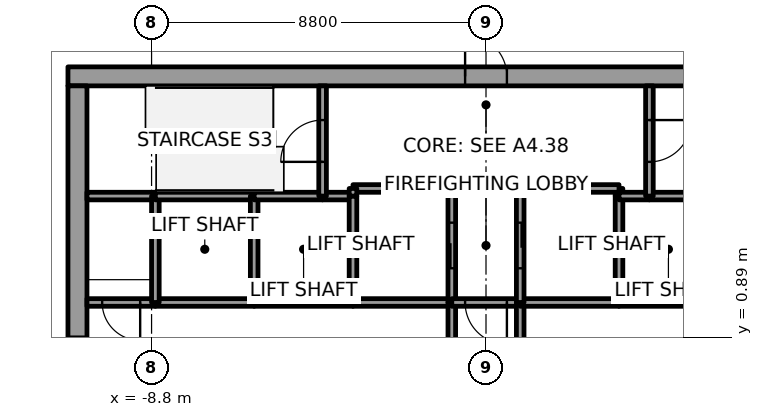
"""IFC4 building model, lengths in metres.
Left out: names, types, materials, properties, quantities, classifications, styles, units other than length and angle.
Written with IfcOpenShell. Run it as: python <this file> out.ifc"""

import sys

from ifc_helpers import new_model, si_unit, direction, frame, frame_2d, origin, place, context, subcontext, project, spatial, rectangle, extrude, element, fill, save


model = new_model("IFC4")
c1 = context("Model", 3, precision=1e-05, world=origin(), true_north=direction((0.0, 1.0)))
c2 = subcontext(c1, "Body", "Model", "MODEL_VIEW")
j1 = project(units=[si_unit("LENGTHUNIT", "METRE"), si_unit("PLANEANGLEUNIT", "RADIAN")], contexts=[c1])
p1 = place(None, origin())
s1 = spatial("IfcSite", under=j1, at=p1, CompositionType="ELEMENT")
p2 = place(p1, origin())
s2 = spatial("IfcBuilding", under=s1, at=p2, CompositionType="ELEMENT")
p3 = place(p2, frame((0.0, 0.0, 165.8)))
s3 = spatial("IfcBuildingStorey", under=s2, at=p3, CompositionType="ELEMENT", Elevation=165.8)
p4 = place(p3, frame((-11.0, 7.75, 0.0), z_axis=(0.0, 0.0, 1.0), x_axis=(1.0, 0.0, 0.0)))
e1 = element("IfcWall", 1, at=p4, inside=s3, PredefinedType="SHEAR", context=c2, shape_type="SweptSolid", body=[
    extrude(rectangle(XDim=22.0, YDim=0.5, at=frame_2d((11.0, 0.0))), origin(), (0.0, 0.0, 1.0), 4.0),
])
p5 = place(p4, frame((10.45, 0.0, 0.0)))
e2 = element("IfcOpeningElement", 2, at=p5, cuts=e1, PredefinedType="OPENING", context=c2, shape_type="SweptSolid", body=[
    extrude(rectangle(XDim=1.1, YDim=2.1, at=frame_2d((0.55, 1.05))), frame((0.0, 0.25, 0.0), z_axis=(0.0, -1.0, 0.0), x_axis=(1.0, 0.0, 0.0)), (0.0, 0.0, 1.0), 0.5),
])
p6 = place(p3, frame((-10.75, -7.5, 0.0), z_axis=(0.0, 0.0, 1.0), x_axis=(0.0, 1.0, 0.0)))
e3 = element("IfcWall", 3, at=p6, inside=s3, PredefinedType="SHEAR", context=c2, shape_type="SweptSolid", body=[
    extrude(rectangle(XDim=15.0, YDim=0.5, at=frame_2d((7.5, 0.0))), origin(), (0.0, 0.0, 1.0), 4.0),
])
p7 = place(p6, frame((6.6, 0.0, 0.0)))
e4 = element("IfcOpeningElement", 4, at=p7, cuts=e3, PredefinedType="OPENING", context=c2, shape_type="SweptSolid", body=[
    extrude(rectangle(XDim=1.8, YDim=2.1, at=frame_2d((0.9, 1.05))), frame((0.0, 0.25, 0.0), z_axis=(0.0, -1.0, 0.0), x_axis=(1.0, 0.0, 0.0)), (0.0, 0.0, 1.0), 0.5),
])
p8 = place(p3, frame((-8.7, 1.8, 0.0), z_axis=(0.0, 0.0, 1.0), x_axis=(-1.0, 0.0, 0.0)))
e5 = element("IfcWall", 5, at=p8, inside=s3, PredefinedType="SOLIDWALL", context=c2, shape_type="SweptSolid", body=[
    extrude(rectangle(XDim=1.8, YDim=0.2, at=frame_2d((0.9, 0.0))), origin(), (0.0, 0.0, 1.0), 3.85),
])
p9 = place(p8, frame((0.4, 0.0, 0.0)))
e6 = element("IfcOpeningElement", 6, at=p9, cuts=e5, PredefinedType="OPENING", context=c2, shape_type="SweptSolid", body=[
    extrude(rectangle(XDim=1.0, YDim=2.1, at=frame_2d((0.5, 1.05))), frame((0.0, 0.1, 0.0), z_axis=(0.0, -1.0, 0.0), x_axis=(1.0, 0.0, 0.0)), (0.0, 0.0, 1.0), 0.2),
])
p10 = place(p3, frame((-8.7, 4.6, 0.0), z_axis=(0.0, 0.0, 1.0), x_axis=(-1.0, 0.0, 0.0)))
e7 = element("IfcWall", 7, at=p10, inside=s3, PredefinedType="SOLIDWALL", context=c2, shape_type="SweptSolid", body=[
    extrude(rectangle(XDim=1.8, YDim=0.2, at=frame_2d((0.9, 0.0))), origin(), (0.0, 0.0, 1.0), 3.85),
])
p11 = place(p3, frame((-6.1, 1.8, 0.0), z_axis=(0.0, 0.0, 1.0), x_axis=(-1.0, 0.0, 0.0)))
e8 = element("IfcWall", 8, at=p11, inside=s3, PredefinedType="SOLIDWALL", context=c2, shape_type="SweptSolid", body=[
    extrude(rectangle(XDim=2.6, YDim=0.2, at=frame_2d((1.3, 0.0))), origin(), (0.0, 0.0, 1.0), 3.85),
])
p12 = place(p3, frame((-8.7, 1.8, 0.0), z_axis=(0.0, 0.0, 1.0), x_axis=(0.0, 1.0, 0.0)))
e9 = element("IfcWall", 9, at=p12, inside=s3, PredefinedType="SOLIDWALL", context=c2, shape_type="SweptSolid", body=[
    extrude(rectangle(XDim=2.8, YDim=0.2, at=frame_2d((1.4, 0.0))), origin(), (0.0, 0.0, 1.0), 3.85),
])
p13 = place(p3, frame((-6.1, 4.6, 0.0), z_axis=(0.0, 0.0, 1.0), x_axis=(-1.0, 0.0, 0.0)))
e10 = element("IfcWall", 10, at=p13, inside=s3, PredefinedType="SOLIDWALL", context=c2, shape_type="SweptSolid", body=[
    extrude(rectangle(XDim=2.6, YDim=0.2, at=frame_2d((1.3, 0.0))), origin(), (0.0, 0.0, 1.0), 3.85),
])
p14 = place(p3, frame((-3.5, 1.8, 0.0), z_axis=(0.0, 0.0, 1.0), x_axis=(-1.0, 0.0, 0.0)))
e11 = element("IfcWall", 11, at=p14, inside=s3, PredefinedType="SOLIDWALL", context=c2, shape_type="SweptSolid", body=[
    extrude(rectangle(XDim=2.6, YDim=0.2, at=frame_2d((1.3, 0.0))), origin(), (0.0, 0.0, 1.0), 3.85),
])
p15 = place(p3, frame((-6.1, 1.8, 0.0), z_axis=(0.0, 0.0, 1.0), x_axis=(0.0, 1.0, 0.0)))
e12 = element("IfcWall", 12, at=p15, inside=s3, PredefinedType="SOLIDWALL", context=c2, shape_type="SweptSolid", body=[
    extrude(rectangle(XDim=2.8, YDim=0.2, at=frame_2d((1.4, 0.0))), origin(), (0.0, 0.0, 1.0), 3.85),
])
p16 = place(p3, frame((-4.3, 4.6, 0.0), z_axis=(0.0, 0.0, 1.0), x_axis=(-1.0, 0.0, 0.0)))
e13 = element("IfcWall", 13, at=p16, inside=s3, PredefinedType="SOLIDWALL", context=c2, shape_type="SweptSolid", body=[
    extrude(rectangle(XDim=1.8, YDim=0.2, at=frame_2d((0.9, 0.0))), origin(), (0.0, 0.0, 1.0), 3.85),
])
p17 = place(p3, frame((-3.5, 4.6, 0.0), z_axis=(0.0, 0.0, 1.0), x_axis=(-1.0, 0.0, 0.0)))
e14 = element("IfcWall", 14, at=p17, inside=s3, PredefinedType="SOLIDWALL", context=c2, shape_type="SweptSolid", body=[
    extrude(rectangle(XDim=0.8, YDim=0.2, at=frame_2d((0.4, 0.0))), origin(), (0.0, 0.0, 1.0), 3.85),
])
p18 = place(p3, frame((-4.3, 4.6, 0.0), z_axis=(0.0, 0.0, 1.0), x_axis=(0.0, 1.0, 0.0)))
e15 = element("IfcWall", 15, at=p18, inside=s3, PredefinedType="SOLIDWALL", context=c2, shape_type="SweptSolid", body=[
    extrude(rectangle(XDim=2.9, YDim=0.2, at=frame_2d((1.45, 0.0))), origin(), (0.0, 0.0, 1.0), 3.85),
])
p19 = place(p18, frame((0.9, 0.0, 0.0)))
e16 = element("IfcOpeningElement", 16, at=p19, cuts=e15, PredefinedType="OPENING", context=c2, shape_type="SweptSolid", body=[
    extrude(rectangle(XDim=1.1, YDim=2.1, at=frame_2d((0.55, 1.05))), frame((0.0, 0.1, 0.0), z_axis=(0.0, -1.0, 0.0), x_axis=(1.0, 0.0, 0.0)), (0.0, 0.0, 1.0), 0.2),
])
p20 = place(p3, frame((-0.9, 1.8, 0.0), z_axis=(0.0, 0.0, 1.0), x_axis=(-1.0, 0.0, 0.0)))
e17 = element("IfcWall", 17, at=p20, inside=s3, PredefinedType="SOLIDWALL", context=c2, shape_type="SweptSolid", body=[
    extrude(rectangle(XDim=2.6, YDim=0.2, at=frame_2d((1.3, 0.0))), origin(), (0.0, 0.0, 1.0), 3.85),
])
p21 = place(p3, frame((-3.5, 4.6, 0.0), z_axis=(0.0, 0.0, 1.0), x_axis=(0.0, -1.0, 0.0)))
e18 = element("IfcWall", 18, at=p21, inside=s3, PredefinedType="SOLIDWALL", context=c2, shape_type="SweptSolid", body=[
    extrude(rectangle(XDim=2.8, YDim=0.2, at=frame_2d((1.4, 0.0))), origin(), (0.0, 0.0, 1.0), 3.85),
])
p22 = place(p3, frame((-0.9, 1.8, 0.0), z_axis=(0.0, 0.0, 1.0), x_axis=(0.0, 1.0, 0.0)))
e19 = element("IfcWall", 19, at=p22, inside=s3, PredefinedType="SOLIDWALL", context=c2, shape_type="SweptSolid", body=[
    extrude(rectangle(XDim=3.0, YDim=0.2, at=frame_2d((1.5, 0.0))), origin(), (0.0, 0.0, 1.0), 3.85),
])
p23 = place(p22, frame((0.9, 0.0, 0.0)))
e20 = element("IfcOpeningElement", 20, at=p23, cuts=e19, PredefinedType="OPENING", context=c2, shape_type="SweptSolid", body=[
    extrude(rectangle(XDim=1.2, YDim=2.1, at=frame_2d((0.6, 1.05))), frame((0.0, 0.1, 0.0), z_axis=(0.0, -1.0, 0.0), x_axis=(1.0, 0.0, 0.0)), (0.0, 0.0, 1.0), 0.2),
])
p24 = place(p3, frame((-0.9, 4.8, 0.0), z_axis=(0.0, 0.0, 1.0), x_axis=(-1.0, 0.0, 0.0)))
e21 = element("IfcWall", 21, at=p24, inside=s3, PredefinedType="SOLIDWALL", context=c2, shape_type="SweptSolid", body=[
    extrude(rectangle(XDim=2.6, YDim=0.2, at=frame_2d((1.3, 0.0))), origin(), (0.0, 0.0, 1.0), 3.85),
])
p25 = place(p3, frame((-3.5, 4.8, 0.0), z_axis=(0.0, 0.0, 1.0), x_axis=(0.0, -1.0, 0.0)))
e22 = element("IfcWall", 22, at=p25, inside=s3, PredefinedType="SOLIDWALL", context=c2, shape_type="SweptSolid", body=[
    extrude(rectangle(XDim=0.2, YDim=0.2, at=frame_2d((0.1, 0.0))), origin(), (0.0, 0.0, 1.0), 3.85),
])
p26 = place(p3, frame((-0.9, 1.8, 0.0), z_axis=(0.0, 0.0, 1.0), x_axis=(0.0, -1.0, 0.0)))
e23 = element("IfcWall", 23, at=p26, inside=s3, PredefinedType="SOLIDWALL", context=c2, shape_type="SweptSolid", body=[
    extrude(rectangle(XDim=3.6, YDim=0.2, at=frame_2d((1.8, 0.0))), origin(), (0.0, 0.0, 1.0), 3.85),
])
p27 = place(p26, frame((1.05, 0.0, 0.0)))
e24 = element("IfcOpeningElement", 24, at=p27, cuts=e23, PredefinedType="OPENING", context=c2, shape_type="SweptSolid", body=[
    extrude(rectangle(XDim=1.5, YDim=2.1, at=frame_2d((0.75, 1.05))), frame((0.0, 0.1, 0.0), z_axis=(0.0, -1.0, 0.0), x_axis=(1.0, 0.0, 0.0)), (0.0, 0.0, 1.0), 0.2),
])
p28 = place(p3, frame((0.9, 1.8, 0.0), z_axis=(0.0, 0.0, 1.0), x_axis=(-1.0, 0.0, 0.0)))
e25 = element("IfcWall", 25, at=p28, inside=s3, PredefinedType="SOLIDWALL", context=c2, shape_type="SweptSolid", body=[
    extrude(rectangle(XDim=1.8, YDim=0.2, at=frame_2d((0.9, 0.0))), origin(), (0.0, 0.0, 1.0), 3.85),
])
p29 = place(p28, frame((0.35, 0.0, 0.0)))
e26 = element("IfcOpeningElement", 26, at=p29, cuts=e25, PredefinedType="OPENING", context=c2, shape_type="SweptSolid", body=[
    extrude(rectangle(XDim=1.1, YDim=2.1, at=frame_2d((0.55, 1.05))), frame((0.0, 0.1, 0.0), z_axis=(0.0, -1.0, 0.0), x_axis=(1.0, 0.0, 0.0)), (0.0, 0.0, 1.0), 0.2),
])
p30 = place(p3, frame((0.9, -1.8, 0.0), z_axis=(0.0, 0.0, 1.0), x_axis=(0.0, 1.0, 0.0)))
e27 = element("IfcWall", 27, at=p30, inside=s3, PredefinedType="SOLIDWALL", context=c2, shape_type="SweptSolid", body=[
    extrude(rectangle(XDim=3.6, YDim=0.2, at=frame_2d((1.8, 0.0))), origin(), (0.0, 0.0, 1.0), 3.85),
])
p31 = place(p30, frame((1.05, 0.0, 0.0)))
e28 = element("IfcOpeningElement", 28, at=p31, cuts=e27, PredefinedType="OPENING", context=c2, shape_type="SweptSolid", body=[
    extrude(rectangle(XDim=1.5, YDim=2.1, at=frame_2d((0.75, 1.05))), frame((0.0, 0.1, 0.0), z_axis=(0.0, -1.0, 0.0), x_axis=(1.0, 0.0, 0.0)), (0.0, 0.0, 1.0), 0.2),
])
p32 = place(p3, frame((3.5, 1.8, 0.0), z_axis=(0.0, 0.0, 1.0), x_axis=(-1.0, 0.0, 0.0)))
e29 = element("IfcWall", 29, at=p32, inside=s3, PredefinedType="SOLIDWALL", context=c2, shape_type="SweptSolid", body=[
    extrude(rectangle(XDim=2.6, YDim=0.2, at=frame_2d((1.3, 0.0))), origin(), (0.0, 0.0, 1.0), 3.85),
])
p33 = place(p3, frame((3.5, 4.6, 0.0), z_axis=(0.0, 0.0, 1.0), x_axis=(0.0, 1.0, 0.0)))
e30 = element("IfcWall", 30, at=p33, inside=s3, PredefinedType="SOLIDWALL", context=c2, shape_type="SweptSolid", body=[
    extrude(rectangle(XDim=0.2, YDim=0.2, at=frame_2d((0.1, 0.0))), origin(), (0.0, 0.0, 1.0), 3.85),
])
p34 = place(p3, frame((3.5, 4.8, 0.0), z_axis=(0.0, 0.0, 1.0), x_axis=(-1.0, 0.0, 0.0)))
e31 = element("IfcWall", 31, at=p34, inside=s3, PredefinedType="SOLIDWALL", context=c2, shape_type="SweptSolid", body=[
    extrude(rectangle(XDim=2.6, YDim=0.2, at=frame_2d((1.3, 0.0))), origin(), (0.0, 0.0, 1.0), 3.85),
])
p35 = place(p3, frame((0.9, 4.8, 0.0), z_axis=(0.0, 0.0, 1.0), x_axis=(0.0, -1.0, 0.0)))
e32 = element("IfcWall", 32, at=p35, inside=s3, PredefinedType="SOLIDWALL", context=c2, shape_type="SweptSolid", body=[
    extrude(rectangle(XDim=3.0, YDim=0.2, at=frame_2d((1.5, 0.0))), origin(), (0.0, 0.0, 1.0), 3.85),
])
p36 = place(p35, frame((0.9, 0.0, 0.0)))
e33 = element("IfcOpeningElement", 33, at=p36, cuts=e32, PredefinedType="OPENING", context=c2, shape_type="SweptSolid", body=[
    extrude(rectangle(XDim=1.2, YDim=2.1, at=frame_2d((0.6, 1.05))), frame((0.0, 0.1, 0.0), z_axis=(0.0, -1.0, 0.0), x_axis=(1.0, 0.0, 0.0)), (0.0, 0.0, 1.0), 0.2),
])
p37 = place(p3, frame((6.1, 1.8, 0.0), z_axis=(0.0, 0.0, 1.0), x_axis=(-1.0, 0.0, 0.0)))
e34 = element("IfcWall", 34, at=p37, inside=s3, PredefinedType="SOLIDWALL", context=c2, shape_type="SweptSolid", body=[
    extrude(rectangle(XDim=2.6, YDim=0.2, at=frame_2d((1.3, 0.0))), origin(), (0.0, 0.0, 1.0), 3.85),
])
p38 = place(p3, frame((3.5, 1.8, 0.0), z_axis=(0.0, 0.0, 1.0), x_axis=(0.0, 1.0, 0.0)))
e35 = element("IfcWall", 35, at=p38, inside=s3, PredefinedType="SOLIDWALL", context=c2, shape_type="SweptSolid", body=[
    extrude(rectangle(XDim=2.8, YDim=0.2, at=frame_2d((1.4, 0.0))), origin(), (0.0, 0.0, 1.0), 3.85),
])
p39 = place(p3, frame((4.3, 4.6, 0.0), z_axis=(0.0, 0.0, 1.0), x_axis=(-1.0, 0.0, 0.0)))
e36 = element("IfcWall", 36, at=p39, inside=s3, PredefinedType="SOLIDWALL", context=c2, shape_type="SweptSolid", body=[
    extrude(rectangle(XDim=0.8, YDim=0.2, at=frame_2d((0.4, 0.0))), origin(), (0.0, 0.0, 1.0), 3.85),
])
p40 = place(p3, frame((6.1, 4.6, 0.0), z_axis=(0.0, 0.0, 1.0), x_axis=(-1.0, 0.0, 0.0)))
e37 = element("IfcWall", 37, at=p40, inside=s3, PredefinedType="SOLIDWALL", context=c2, shape_type="SweptSolid", body=[
    extrude(rectangle(XDim=1.8, YDim=0.2, at=frame_2d((0.9, 0.0))), origin(), (0.0, 0.0, 1.0), 3.85),
])
p41 = place(p3, frame((4.3, 7.5, 0.0), z_axis=(0.0, 0.0, 1.0), x_axis=(0.0, -1.0, 0.0)))
e38 = element("IfcWall", 38, at=p41, inside=s3, PredefinedType="SOLIDWALL", context=c2, shape_type="SweptSolid", body=[
    extrude(rectangle(XDim=2.9, YDim=0.2, at=frame_2d((1.45, 0.0))), origin(), (0.0, 0.0, 1.0), 3.85),
])
p42 = place(p41, frame((0.9, 0.0, 0.0)))
e39 = element("IfcOpeningElement", 39, at=p42, cuts=e38, PredefinedType="OPENING", context=c2, shape_type="SweptSolid", body=[
    extrude(rectangle(XDim=1.1, YDim=2.1, at=frame_2d((0.55, 1.05))), frame((0.0, 0.1, 0.0), z_axis=(0.0, -1.0, 0.0), x_axis=(1.0, 0.0, 0.0)), (0.0, 0.0, 1.0), 0.2),
])
p43 = place(p23, origin())
e40 = element("IfcDoor", 40, at=p43, inside=s3, OperationType="SLIDING_TO_LEFT", PredefinedType="DOOR", context=c2, shape_type="SweptSolid", body=[
    extrude(rectangle(XDim=1.2, YDim=2.1, at=frame_2d((0.6, 1.05))), frame((0.0, 0.025, 0.0), z_axis=(0.0, -1.0, 0.0), x_axis=(1.0, 0.0, 0.0)), (0.0, 0.0, 1.0), 0.05),
])
fill(e20, e40)
p44 = place(p36, origin())
e41 = element("IfcDoor", 41, at=p44, inside=s3, OperationType="SLIDING_TO_LEFT", PredefinedType="DOOR", context=c2, shape_type="SweptSolid", body=[
    extrude(rectangle(XDim=1.2, YDim=2.1, at=frame_2d((0.6, 1.05))), frame((0.0, 0.025, 0.0), z_axis=(0.0, -1.0, 0.0), x_axis=(1.0, 0.0, 0.0)), (0.0, 0.0, 1.0), 0.05),
])
fill(e33, e41)
p45 = place(p29, origin())
e42 = element("IfcDoor", 42, at=p45, inside=s3, OperationType="SINGLE_SWING_RIGHT", PredefinedType="DOOR", context=c2, shape_type="SweptSolid", body=[
    extrude(rectangle(XDim=1.1, YDim=2.1, at=frame_2d((0.55, 1.05))), frame((0.0, 0.025, 0.0), z_axis=(0.0, -1.0, 0.0), x_axis=(1.0, 0.0, 0.0)), (0.0, 0.0, 1.0), 0.05),
])
fill(e26, e42)
p46 = place(p9, origin())
e43 = element("IfcDoor", 43, at=p46, inside=s3, OperationType="SINGLE_SWING_RIGHT", PredefinedType="DOOR", context=c2, shape_type="SweptSolid", body=[
    extrude(rectangle(XDim=1.0, YDim=2.1, at=frame_2d((0.5, 1.05))), frame((0.0, 0.025, 0.0), z_axis=(0.0, -1.0, 0.0), x_axis=(1.0, 0.0, 0.0)), (0.0, 0.0, 1.0), 0.05),
])
fill(e6, e43)
p47 = place(p19, origin())
e44 = element("IfcDoor", 44, at=p47, inside=s3, OperationType="SINGLE_SWING_LEFT", PredefinedType="DOOR", context=c2, shape_type="SweptSolid", body=[
    extrude(rectangle(XDim=1.1, YDim=2.1, at=frame_2d((0.55, 1.05))), frame((0.0, 0.025, 0.0), z_axis=(0.0, -1.0, 0.0), x_axis=(1.0, 0.0, 0.0)), (0.0, 0.0, 1.0), 0.05),
])
fill(e16, e44)
p48 = place(p42, origin())
e45 = element("IfcDoor", 45, at=p48, inside=s3, OperationType="SINGLE_SWING_RIGHT", PredefinedType="DOOR", context=c2, shape_type="SweptSolid", body=[
    extrude(rectangle(XDim=1.1, YDim=2.1, at=frame_2d((0.55, 1.05))), frame((0.0, 0.025, 0.0), z_axis=(0.0, -1.0, 0.0), x_axis=(1.0, 0.0, 0.0)), (0.0, 0.0, 1.0), 0.05),
])
fill(e39, e45)
p49 = place(p7, origin())
e46 = element("IfcDoor", 46, at=p49, inside=s3, OperationType="DOUBLE_DOOR_SINGLE_SWING", PredefinedType="DOOR", context=c2, shape_type="SweptSolid", body=[
    extrude(rectangle(XDim=1.8, YDim=2.1, at=frame_2d((0.9, 1.05))), frame((0.0, 0.025, 0.0), z_axis=(0.0, -1.0, 0.0), x_axis=(1.0, 0.0, 0.0)), (0.0, 0.0, 1.0), 0.05),
])
fill(e4, e46)
p50 = place(p5, origin())
e47 = element("IfcDoor", 47, at=p50, inside=s3, OperationType="SINGLE_SWING_LEFT", PredefinedType="DOOR", context=c2, shape_type="SweptSolid", body=[
    extrude(rectangle(XDim=1.1, YDim=2.1, at=frame_2d((0.55, 1.05))), frame((0.0, 0.025, 0.0), z_axis=(0.0, -1.0, 0.0), x_axis=(1.0, 0.0, 0.0)), (0.0, 0.0, 1.0), 0.05),
])
fill(e2, e47)
save(model, sys.argv[1])
